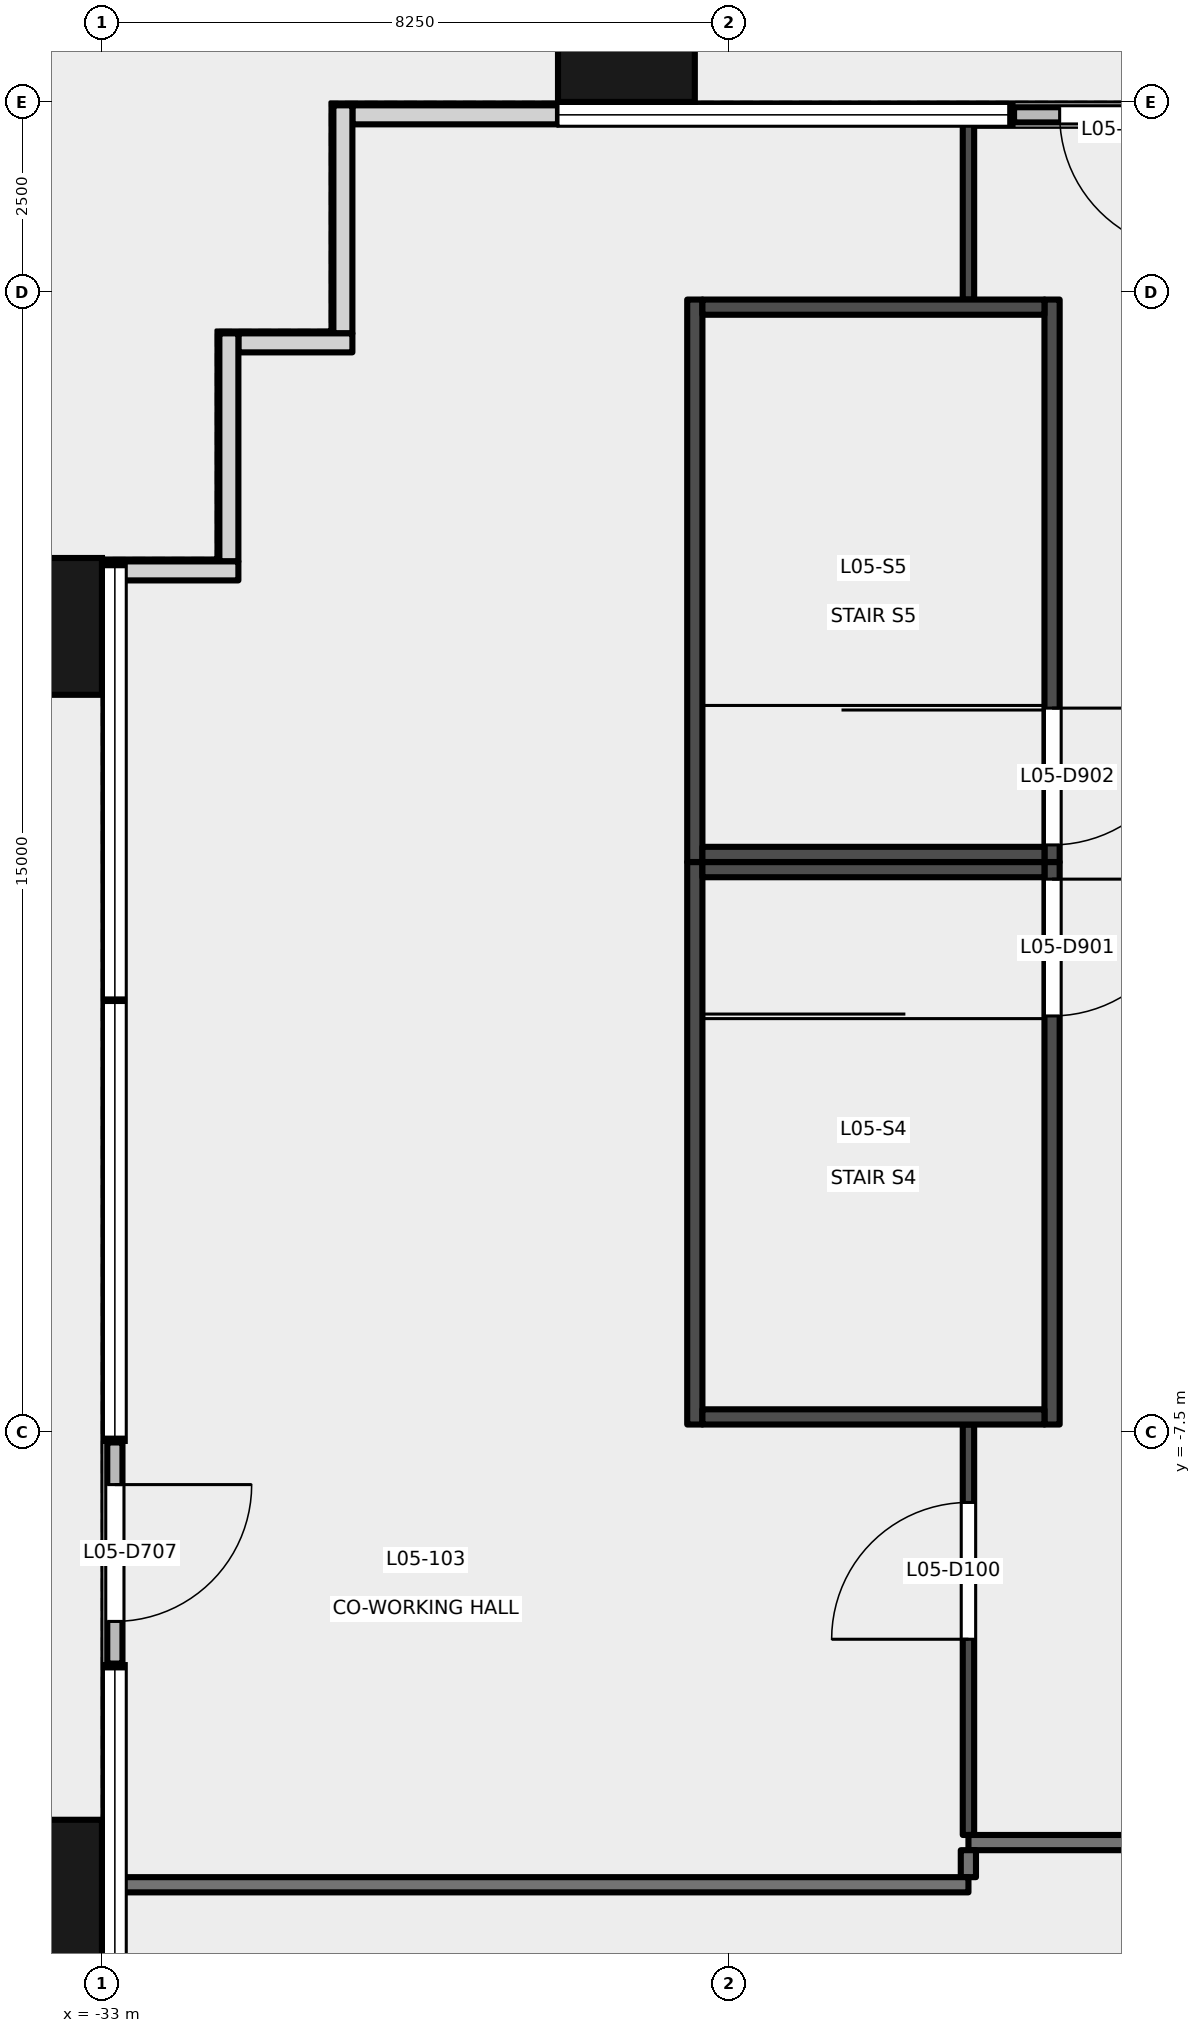
"""IFC4 building model, lengths in metres.
Left out: names, types, materials, properties, quantities, classifications, styles, units other than length and angle.
Written with IfcOpenShell. Run it as: python <this file> out.ifc"""

import sys

from ifc_helpers import new_model, si_unit, direction, frame, frame_2d, origin, origin_2d, place, context, subcontext, project, spatial, rectangle, extrude, element, fill, save


model = new_model("IFC4")
c1 = context("Model", 3, precision=1e-05, world=origin(), true_north=direction((0.0, 1.0)))
c2 = subcontext(c1, "Body", "Model", "MODEL_VIEW")
j1 = project(units=[si_unit("LENGTHUNIT", "METRE"), si_unit("PLANEANGLEUNIT", "RADIAN")], contexts=[c1])
p1 = place(None, origin())
s1 = spatial("IfcSite", under=j1, at=p1, CompositionType="ELEMENT")
p2 = place(p1, origin())
s2 = spatial("IfcBuilding", under=s1, at=p2, CompositionType="ELEMENT")
p3 = place(p2, frame((0.0, 0.0, 27.0)))
s3 = spatial("IfcBuildingStorey", under=s2, at=p3, CompositionType="ELEMENT", Elevation=27.0)
for number, where, z_axis, x_axis in (
    (1, (-33.9, -13.5, -0.2), (0.0, 0.0, 1.0), (0.0, 1.0, 0.0)),
    (2, (-33.9, 3.1, -0.2), (0.0, 0.0, 1.0), (0.0, 1.0, 0.0)),
    (3, (-26.1, 10.9, -0.2), (0.0, 0.0, 1.0), (1.0, 0.0, 0.0)),
):
    element("IfcColumn", number, at=place(p3, frame(where, z_axis=z_axis, x_axis=x_axis)), inside=s3, PredefinedType="COLUMN", context=c2, shape_type="SweptSolid", body=[
        extrude(rectangle(XDim=1.8, YDim=1.8, at=origin_2d()), origin(), (0.0, 0.0, 1.0), 5.4),
    ])
p4 = place(p3, frame((-18.0, 9.83, 0.0), z_axis=(0.0, 0.0, 1.0), x_axis=(-1.0, 0.0, 0.0)))
e4 = element("IfcWall", 4, at=p4, inside=s3, PredefinedType="SOLIDWALL", context=c2, shape_type="SweptSolid", body=[
    extrude(rectangle(XDim=3.0, YDim=0.2, at=frame_2d((1.5, 0.0))), origin(), (0.0, 0.0, 1.0), 4.1),
])
p5 = place(p4, frame((0.6, 0.0, 0.0)))
e5 = element("IfcOpeningElement", 5, at=p5, cuts=e4, PredefinedType="OPENING", context=c2, shape_type="SweptSolid", body=[
    extrude(rectangle(XDim=1.8, YDim=2.4, at=frame_2d((0.9, 1.2))), frame((0.0, 0.111, 0.0), z_axis=(0.0, -1.0, 0.0), x_axis=(1.0, 0.0, 0.0)), (0.0, 0.0, 1.0), 0.221),
])
p6 = place(p3, frame((-27.0, 9.83, 0.0), z_axis=(0.0, 0.0, 1.0), x_axis=(-1.0, 0.0, 0.0)))
e6 = element("IfcWall", 6, at=p6, inside=s3, PredefinedType="SOLIDWALL", context=c2, shape_type="SweptSolid", body=[
    extrude(rectangle(XDim=2.705, YDim=0.25, at=frame_2d((1.353, 0.0))), origin(), (0.0, 0.0, 1.0), 5.2),
])
p7 = place(p3, frame((-29.83, 9.955, 0.0), z_axis=(0.0, 0.0, 1.0), x_axis=(0.0, -1.0, 0.0)))
e7 = element("IfcWall", 7, at=p7, inside=s3, PredefinedType="SOLIDWALL", context=c2, shape_type="SweptSolid", body=[
    extrude(rectangle(XDim=3.0, YDim=0.25, at=frame_2d((1.5, 0.0))), origin(), (0.0, 0.0, 1.0), 5.2),
])
p8 = place(p3, frame((-29.705, 6.83, 0.0), z_axis=(0.0, 0.0, 1.0), x_axis=(-1.0, 0.0, 0.0)))
e8 = element("IfcWall", 8, at=p8, inside=s3, PredefinedType="SOLIDWALL", context=c2, shape_type="SweptSolid", body=[
    extrude(rectangle(XDim=1.5, YDim=0.25, at=frame_2d((0.75, 0.0))), origin(), (0.0, 0.0, 1.0), 5.2),
])
p9 = place(p3, frame((-31.33, 6.955, 0.0), z_axis=(0.0, 0.0, 1.0), x_axis=(0.0, -1.0, 0.0)))
e9 = element("IfcWall", 9, at=p9, inside=s3, PredefinedType="SOLIDWALL", context=c2, shape_type="SweptSolid", body=[
    extrude(rectangle(XDim=3.0, YDim=0.25, at=frame_2d((1.5, 0.0))), origin(), (0.0, 0.0, 1.0), 5.2),
])
p10 = place(p3, frame((-31.205, 3.83, 0.0), z_axis=(0.0, 0.0, 1.0), x_axis=(-1.0, 0.0, 0.0)))
e10 = element("IfcWall", 10, at=p10, inside=s3, PredefinedType="SOLIDWALL", context=c2, shape_type="SweptSolid", body=[
    extrude(rectangle(XDim=1.8, YDim=0.25, at=frame_2d((0.9, 0.0))), origin(), (0.0, 0.0, 1.0), 5.2),
])
p11 = place(p3, frame((-32.83, -7.636, 0.0), z_axis=(0.0, 0.0, 1.0), x_axis=(0.0, -1.0, 0.0)))
e11 = element("IfcWall", 11, at=p11, inside=s3, PredefinedType="SOLIDWALL", context=c2, shape_type="SweptSolid", body=[
    extrude(rectangle(XDim=2.909, YDim=0.2, at=frame_2d((1.455, 0.0))), origin(), (0.0, 0.0, 1.0), 4.1),
])
p12 = place(p11, frame((0.554, 0.0, 0.0)))
e12 = element("IfcOpeningElement", 12, at=p12, cuts=e11, PredefinedType="OPENING", context=c2, shape_type="SweptSolid", body=[
    extrude(rectangle(XDim=1.8, YDim=2.4, at=frame_2d((0.9, 1.2))), frame((0.0, 0.111, 0.0), z_axis=(0.0, -1.0, 0.0), x_axis=(1.0, 0.0, 0.0)), (0.0, 0.0, 1.0), 0.221),
])
p13 = place(p3, frame((-20.5, 0.0, -0.2), z_axis=(0.0, 0.0, 1.0), x_axis=(0.0, -1.0, 0.0)))
e13 = element("IfcWall", 13, at=p13, inside=s3, PredefinedType="SHEAR", context=c2, shape_type="SweptSolid", body=[
    extrude(rectangle(XDim=7.4, YDim=0.2, at=frame_2d((3.7, 0.0))), origin(), (0.0, 0.0, 1.0), 5.4),
])
p14 = place(p13, frame((0.225, 0.0, 0.2)))
e14 = element("IfcOpeningElement", 14, at=p14, cuts=e13, PredefinedType="OPENING", context=c2, shape_type="SweptSolid", body=[
    extrude(rectangle(XDim=1.8, YDim=2.1, at=frame_2d((0.9, 1.05))), frame((0.0, 0.111, 0.0), z_axis=(0.0, -1.0, 0.0), x_axis=(1.0, 0.0, 0.0)), (0.0, 0.0, 1.0), 0.221),
])
p15 = place(p3, frame((-25.2, -7.4, -0.2), z_axis=(0.0, 0.0, 1.0), x_axis=(0.0, 1.0, 0.0)))
e15 = element("IfcWall", 15, at=p15, inside=s3, PredefinedType="SHEAR", context=c2, shape_type="SweptSolid", body=[
    extrude(rectangle(XDim=7.4, YDim=0.2, at=frame_2d((3.7, 0.0))), origin(), (0.0, 0.0, 1.0), 5.4),
])
for number, where, z_axis, x_axis in (
    (16, (-25.1, -0.1, -0.2), (0.0, 0.0, 1.0), (1.0, 0.0, 0.0)),
    (17, (-25.1, -7.3, -0.2), (0.0, 0.0, 1.0), (1.0, 0.0, 0.0)),
):
    element("IfcWall", number, at=place(p3, frame(where, z_axis=z_axis, x_axis=x_axis)), inside=s3, PredefinedType="SHEAR", context=c2, shape_type="SweptSolid", body=[
        extrude(rectangle(XDim=4.5, YDim=0.2, at=frame_2d((2.25, 0.0))), origin(), (0.0, 0.0, 1.0), 5.4),
    ])
p16 = place(p3, frame((-20.5, 7.4, -0.2), z_axis=(0.0, 0.0, 1.0), x_axis=(0.0, -1.0, 0.0)))
e18 = element("IfcWall", 18, at=p16, inside=s3, PredefinedType="SHEAR", context=c2, shape_type="SweptSolid", body=[
    extrude(rectangle(XDim=7.4, YDim=0.2, at=frame_2d((3.7, 0.0))), origin(), (0.0, 0.0, 1.0), 5.4),
])
p17 = place(p16, frame((5.375, 0.0, 0.2)))
e19 = element("IfcOpeningElement", 19, at=p17, cuts=e18, PredefinedType="OPENING", context=c2, shape_type="SweptSolid", body=[
    extrude(rectangle(XDim=1.8, YDim=2.1, at=frame_2d((0.9, 1.05))), frame((0.0, 0.111, 0.0), z_axis=(0.0, -1.0, 0.0), x_axis=(1.0, 0.0, 0.0)), (0.0, 0.0, 1.0), 0.221),
])
p18 = place(p3, frame((-25.2, 0.0, -0.2), z_axis=(0.0, 0.0, 1.0), x_axis=(0.0, 1.0, 0.0)))
e20 = element("IfcWall", 20, at=p18, inside=s3, PredefinedType="SHEAR", context=c2, shape_type="SweptSolid", body=[
    extrude(rectangle(XDim=7.4, YDim=0.2, at=frame_2d((3.7, 0.0))), origin(), (0.0, 0.0, 1.0), 5.4),
])
for number, where, z_axis, x_axis in (
    (21, (-25.1, 7.3, -0.2), (0.0, 0.0, 1.0), (1.0, 0.0, 0.0)),
    (22, (-25.1, 0.1, -0.2), (0.0, 0.0, 1.0), (1.0, 0.0, 0.0)),
):
    element("IfcWall", number, at=place(p3, frame(where, z_axis=z_axis, x_axis=x_axis)), inside=s3, PredefinedType="SHEAR", context=c2, shape_type="SweptSolid", body=[
        extrude(rectangle(XDim=4.5, YDim=0.2, at=frame_2d((2.25, 0.0))), origin(), (0.0, 0.0, 1.0), 5.4),
    ])
p19 = place(p3, frame((-21.6, -12.8, 0.0), z_axis=(0.0, 0.0, 1.0), x_axis=(0.0, 1.0, 0.0)))
e23 = element("IfcWall", 23, at=p19, inside=s3, PredefinedType="PARTITIONING", context=c2, shape_type="SweptSolid", body=[
    extrude(rectangle(XDim=5.4, YDim=0.15, at=frame_2d((2.7, 0.0))), origin(), (0.0, 0.0, 1.0), 4.6),
])
p20 = place(p19, frame((2.575, 0.0, 0.0)))
e24 = element("IfcOpeningElement", 24, at=p20, cuts=e23, PredefinedType="OPENING", context=c2, shape_type="SweptSolid", body=[
    extrude(rectangle(XDim=1.8, YDim=2.1, at=frame_2d((0.9, 1.05))), frame((0.0, 0.085, 0.0), z_axis=(0.0, -1.0, 0.0), x_axis=(1.0, 0.0, 0.0)), (0.0, 0.0, 1.0), 0.171),
])
p21 = place(p3, frame((-21.6, 7.4, 0.0), z_axis=(0.0, 0.0, 1.0), x_axis=(0.0, 1.0, 0.0)))
e25 = element("IfcWall", 25, at=p21, inside=s3, PredefinedType="PARTITIONING", context=c2, shape_type="SweptSolid", body=[
    extrude(rectangle(XDim=2.34, YDim=0.15, at=frame_2d((1.17, 0.0))), origin(), (0.0, 0.0, 1.0), 5.2),
])
p22 = place(p3, frame((-12.1, -12.9, 0.0), z_axis=(0.0, 0.0, 1.0), x_axis=(-1.0, 0.0, 0.0)))
e26 = element("IfcWall", 26, at=p22, inside=s3, PredefinedType="PARTITIONING", context=c2, shape_type="SweptSolid", body=[
    extrude(rectangle(XDim=9.5, YDim=0.2, at=frame_2d((4.75, 0.0))), origin(), (0.0, 0.0, 1.0), 3.8),
])
p23 = place(p22, frame((4.3, 0.0, 0.0)))
e27 = element("IfcOpeningElement", 27, at=p23, cuts=e26, PredefinedType="OPENING", context=c2, shape_type="SweptSolid", body=[
    extrude(rectangle(XDim=0.9, YDim=2.1, at=frame_2d((0.45, 1.05))), frame((0.0, 0.111, 0.0), z_axis=(0.0, -1.0, 0.0), x_axis=(1.0, 0.0, 0.0)), (0.0, 0.0, 1.0), 0.221),
])
p24 = place(p3, frame((-21.601, -13.0, 0.0), z_axis=(0.0, 0.0, 1.0), x_axis=(0.0, -1.0, 0.0)))
e28 = element("IfcWall", 28, at=p24, inside=s3, PredefinedType="PARTITIONING", context=c2, shape_type="SweptSolid", body=[
    extrude(rectangle(XDim=0.355, YDim=0.2, at=frame_2d((0.177, 0.0))), origin(), (0.0, 0.0, 1.0), 4.6),
])
p25 = place(p3, frame((-21.6, -13.455, 0.0), z_axis=(0.0, 0.0, 1.0), x_axis=(-1.0, 0.0, 0.0)))
e29 = element("IfcWall", 29, at=p25, inside=s3, PredefinedType="PARTITIONING", context=c2, shape_type="SweptSolid", body=[
    extrude(rectangle(XDim=11.14, YDim=0.2, at=frame_2d((5.57, 0.0))), origin(), (0.0, 0.0, 1.0), 4.6),
])
p26 = place(p5, origin())
e30 = element("IfcDoor", 30, at=p26, inside=s3, OperationType="DOUBLE_DOOR_SINGLE_SWING", PredefinedType="DOOR", context=c2, shape_type="SweptSolid", body=[
    extrude(rectangle(XDim=1.8, YDim=2.4, at=frame_2d((0.9, 1.2))), frame((0.0, 0.025, 0.0), z_axis=(0.0, -1.0, 0.0), x_axis=(1.0, 0.0, 0.0)), (0.0, 0.0, 1.0), 0.05),
])
fill(e5, e30)
p27 = place(p12, origin())
e31 = element("IfcDoor", 31, at=p27, inside=s3, OperationType="DOUBLE_DOOR_SINGLE_SWING", PredefinedType="DOOR", context=c2, shape_type="SweptSolid", body=[
    extrude(rectangle(XDim=1.8, YDim=2.4, at=frame_2d((0.9, 1.2))), frame((0.0, 0.025, 0.0), z_axis=(0.0, -1.0, 0.0), x_axis=(1.0, 0.0, 0.0)), (0.0, 0.0, 1.0), 0.05),
])
fill(e12, e31)
p28 = place(p14, origin())
e32 = element("IfcDoor", 32, at=p28, inside=s3, OperationType="DOUBLE_DOOR_SINGLE_SWING", PredefinedType="DOOR", context=c2, shape_type="SweptSolid", body=[
    extrude(rectangle(XDim=1.8, YDim=2.1, at=frame_2d((0.9, 1.05))), frame((0.0, 0.025, 0.0), z_axis=(0.0, -1.0, 0.0), x_axis=(1.0, 0.0, 0.0)), (0.0, 0.0, 1.0), 0.05),
])
fill(e14, e32)
p29 = place(p17, origin())
e33 = element("IfcDoor", 33, at=p29, inside=s3, OperationType="DOUBLE_DOOR_SINGLE_SWING", PredefinedType="DOOR", context=c2, shape_type="SweptSolid", body=[
    extrude(rectangle(XDim=1.8, YDim=2.1, at=frame_2d((0.9, 1.05))), frame((0.0, 0.025, 0.0), z_axis=(0.0, -1.0, 0.0), x_axis=(1.0, 0.0, 0.0)), (0.0, 0.0, 1.0), 0.05),
])
fill(e19, e33)
p30 = place(p20, origin())
e34 = element("IfcDoor", 34, at=p30, inside=s3, OperationType="DOUBLE_DOOR_SINGLE_SWING", PredefinedType="DOOR", context=c2, shape_type="SweptSolid", body=[
    extrude(rectangle(XDim=1.8, YDim=2.1, at=frame_2d((0.9, 1.05))), frame((0.0, 0.025, 0.0), z_axis=(0.0, -1.0, 0.0), x_axis=(1.0, 0.0, 0.0)), (0.0, 0.0, 1.0), 0.05),
])
fill(e24, e34)
save(model, sys.argv[1])
